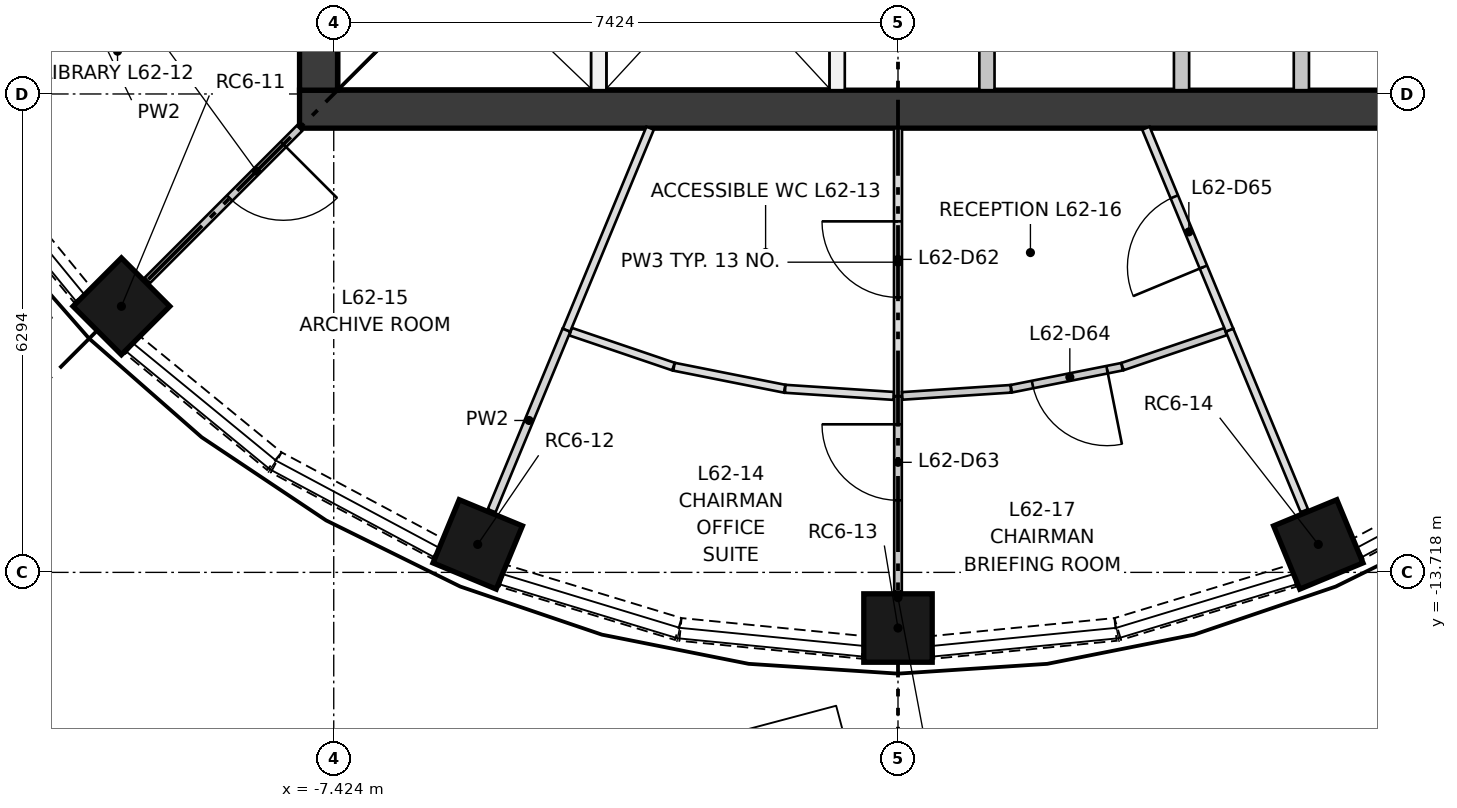
"""IFC4 building model, lengths in metres.
Left out: names, types, materials, properties, quantities, classifications, styles, units other than length and angle.
Written with IfcOpenShell. Run it as: python <this file> out.ifc"""

import sys

from ifc_helpers import new_model, si_unit, direction, frame, frame_2d, origin, origin_2d, place, context, subcontext, project, spatial, rectangle, extrude, element, fill, save


model = new_model("IFC4")
c1 = context("Model", 3, precision=1e-05, world=origin(), true_north=direction((0.0, 1.0)))
c2 = subcontext(c1, "Body", "Model", "MODEL_VIEW")
j1 = project(units=[si_unit("LENGTHUNIT", "METRE"), si_unit("PLANEANGLEUNIT", "RADIAN")], contexts=[c1])
p1 = place(None, origin())
s1 = spatial("IfcSite", under=j1, at=p1, CompositionType="ELEMENT")
p2 = place(p1, origin())
s2 = spatial("IfcBuilding", under=s1, at=p2, CompositionType="ELEMENT")
p3 = place(p2, frame((0.0, 0.0, 227.85)))
s3 = spatial("IfcBuildingStorey", under=s2, at=p3, CompositionType="ELEMENT", Elevation=227.85)
for number, where, z_axis, x_axis in (
    (1, (-10.218, -10.218, 0.5), (0.0, 0.0, 1.0), (-0.707, -0.707, 0.0)),
    (2, (-5.53, -13.35, 0.5), (0.0, 0.0, 1.0), (-0.383, -0.924, 0.0)),
    (3, (0.0, -14.45, 0.5), (0.0, 0.0, 1.0), (0.0, -1.0, 0.0)),
    (4, (5.53, -13.35, 0.5), (0.0, 0.0, 1.0), (0.383, -0.924, 0.0)),
):
    element("IfcColumn", number, at=place(p3, frame(where, z_axis=z_axis, x_axis=x_axis)), inside=s3, PredefinedType="COLUMN", context=c2, shape_type="SweptSolid", body=[
        extrude(rectangle(XDim=0.9, YDim=0.9, at=origin_2d()), origin(), (0.0, 0.0, 1.0), 2.35),
    ])
p4 = place(p3, frame((-7.874, -7.624, 0.0), z_axis=(0.0, 0.0, 1.0), x_axis=(1.0, 0.0, 0.0)))
e5 = element("IfcWall", 5, at=p4, inside=s3, PredefinedType="SHEAR", context=c2, shape_type="SweptSolid", body=[
    extrude(rectangle(XDim=15.748, YDim=0.5, at=frame_2d((7.874, 0.0))), origin(), (0.0, 0.0, 1.0), 3.35),
])
p5 = place(p3, frame((-7.624, -7.374, 0.0), z_axis=(0.0, 0.0, 1.0), x_axis=(0.0, 1.0, 0.0)))
e6 = element("IfcWall", 6, at=p5, inside=s3, PredefinedType="SHEAR", context=c2, shape_type="SweptSolid", body=[
    extrude(rectangle(XDim=14.748, YDim=0.5, at=frame_2d((7.374, 0.0))), origin(), (0.0, 0.0, 1.0), 3.35),
])
p6 = place(p5, frame((6.874, 0.0, 0.0)))
e7 = element("IfcOpeningElement", 7, at=p6, cuts=e6, PredefinedType="OPENING", context=c2, shape_type="SweptSolid", body=[
    extrude(rectangle(XDim=1.0, YDim=2.1, at=frame_2d((0.5, 1.05))), frame((0.0, 0.26, 0.0), z_axis=(0.0, -1.0, 0.0), x_axis=(1.0, 0.0, 0.0)), (0.0, 0.0, 1.0), 0.52),
])
p7 = place(p5, frame((3.75, 0.0, 0.0)))
e8 = element("IfcOpeningElement", 8, at=p7, cuts=e6, PredefinedType="OPENING", context=c2, shape_type="SweptSolid", body=[
    extrude(rectangle(XDim=1.8, YDim=2.1, at=frame_2d((0.9, 1.05))), frame((0.0, 0.26, 0.0), z_axis=(0.0, -1.0, 0.0), x_axis=(1.0, 0.0, 0.0)), (0.0, 0.0, 1.0), 0.52),
])
p8 = place(p5, frame((9.198, 0.0, 0.0)))
e9 = element("IfcOpeningElement", 9, at=p8, cuts=e6, PredefinedType="OPENING", context=c2, shape_type="SweptSolid", body=[
    extrude(rectangle(XDim=1.8, YDim=2.1, at=frame_2d((0.9, 1.05))), frame((0.0, 0.26, 0.0), z_axis=(0.0, -1.0, 0.0), x_axis=(1.0, 0.0, 0.0)), (0.0, 0.0, 1.0), 0.52),
])
for number, where, z_axis, x_axis in (
    (10, (-3.937, -7.374, 0.0), (0.0, 0.0, 1.0), (0.0, 1.0, 0.0)),
    (11, (-0.8, -7.374, 0.0), (0.0, 0.0, 1.0), (0.0, 1.0, 0.0)),
    (12, (1.17, -7.374, 0.0), (0.0, 0.0, 1.0), (0.0, 1.0, 0.0)),
    (13, (3.73, -7.374, 0.0), (0.0, 0.0, 1.0), (0.0, 1.0, 0.0)),
    (14, (5.307, -7.374, 0.0), (0.0, 0.0, 1.0), (0.0, 1.0, 0.0)),
):
    element("IfcWall", number, at=place(p3, frame(where, z_axis=z_axis, x_axis=x_axis)), inside=s3, PredefinedType="PARTITIONING", context=c2, shape_type="SweptSolid", body=[
        extrude(rectangle(XDim=3.2, YDim=0.2, at=frame_2d((1.6, 0.0))), origin(), (0.0, 0.0, 1.0), 3.0),
    ])
for number, where, z_axis, x_axis in (
    (15, (-12.254, -8.206, 0.0), (0.0, 0.0, 1.0), (0.634, -0.773, 0.0)),
    (16, (-10.07, -10.726, 0.0), (0.0, 0.0, 1.0), (0.773, -0.634, 0.0)),
):
    element("IfcWall", number, at=place(p3, frame(where, z_axis=z_axis, x_axis=x_axis)), inside=s3, PredefinedType="SOLIDWALL", context=c2, shape_type="SweptSolid", body=[
        extrude(rectangle(XDim=2.411, YDim=0.3, at=frame_2d((1.206, 0.0))), origin(), (0.0, 0.0, 1.0), 0.9),
    ])
p9 = place(p3, frame((-8.181, -12.271, 0.0), z_axis=(0.0, 0.0, 1.0), x_axis=(0.881962886229, -0.471318859495, 0.0)))
e17 = element("IfcWall", 17, at=p9, inside=s3, PredefinedType="SOLIDWALL", context=c2, shape_type="SweptSolid", body=[
    extrude(rectangle(XDim=2.41, YDim=0.3, at=frame_2d((1.205, 0.0))), origin(), (0.0, 0.0, 1.0), 0.9),
])
p10 = place(p3, frame((-5.198, -13.762, 0.0), z_axis=(0.0, 0.0, 1.0), x_axis=(0.956901683383, -0.290412066449, 0.0)))
e18 = element("IfcWall", 18, at=p10, inside=s3, PredefinedType="SOLIDWALL", context=c2, shape_type="SweptSolid", body=[
    extrude(rectangle(XDim=2.411, YDim=0.3, at=frame_2d((1.206, 0.0))), origin(), (0.0, 0.0, 1.0), 0.9),
])
for number, where, z_axis, x_axis in (
    (19, (-2.862, -14.469, 0.0), (0.0, 0.0, 1.0), (0.995, -0.098, 0.0)),
    (20, (0.463, -14.705, 0.0), (0.0, 0.0, 1.0), (0.995, 0.098, 0.0)),
):
    element("IfcWall", number, at=place(p3, frame(where, z_axis=z_axis, x_axis=x_axis)), inside=s3, PredefinedType="SOLIDWALL", context=c2, shape_type="SweptSolid", body=[
        extrude(rectangle(XDim=2.411, YDim=0.3, at=frame_2d((1.205, 0.0))), origin(), (0.0, 0.0, 1.0), 0.9),
    ])
p11 = place(p3, frame((2.891, -14.463, 0.0), z_axis=(0.0, 0.0, 1.0), x_axis=(0.956901683383, 0.290412066449, 0.0)))
e21 = element("IfcWall", 21, at=p11, inside=s3, PredefinedType="SOLIDWALL", context=c2, shape_type="SweptSolid", body=[
    extrude(rectangle(XDim=2.411, YDim=0.3, at=frame_2d((1.206, 0.0))), origin(), (0.0, 0.0, 1.0), 0.9),
])
p12 = place(p3, frame((6.055, -13.407, 0.0), z_axis=(0.0, 0.0, 1.0), x_axis=(0.881962886229, 0.471318859495, 0.0)))
e22 = element("IfcWall", 22, at=p12, inside=s3, PredefinedType="SOLIDWALL", context=c2, shape_type="SweptSolid", body=[
    extrude(rectangle(XDim=2.41, YDim=0.3, at=frame_2d((1.205, 0.0))), origin(), (0.0, 0.0, 1.0), 0.9),
])
p13 = place(p3, frame((-7.874, -7.874, 0.0), z_axis=(0.0, 0.0, 1.0), x_axis=(-0.707106781187, -0.707106781187, 0.0)))
e23 = element("IfcWall", 23, at=p13, inside=s3, PredefinedType="PARTITIONING", context=c2, shape_type="SweptSolid", body=[
    extrude(rectangle(XDim=2.835, YDim=0.1, at=frame_2d((1.417, 0.0))), origin(), (0.0, 0.0, 1.0), 3.0),
])
p14 = place(p13, frame((0.3, 0.0, 0.0)))
e24 = element("IfcOpeningElement", 24, at=p14, cuts=e23, PredefinedType="OPENING", context=c2, shape_type="SweptSolid", body=[
    extrude(rectangle(XDim=1.0, YDim=2.1, at=frame_2d((0.5, 1.05))), frame((0.0, 0.06, 0.0), z_axis=(0.0, -1.0, 0.0), x_axis=(1.0, 0.0, 0.0)), (0.0, 0.0, 1.0), 0.12),
])
p15 = place(p3, frame((-2.954, -11.01, 0.0), z_axis=(0.0, 0.0, 1.0), x_axis=(-0.946909066327, 0.321501508719, 0.0)))
e25 = element("IfcWall", 25, at=p15, inside=s3, PredefinedType="PARTITIONING", context=c2, shape_type="SweptSolid", body=[
    extrude(rectangle(XDim=1.429, YDim=0.105, at=frame_2d((0.715, 0.0))), origin(), (0.0, 0.0, 1.0), 3.0),
])
p16 = place(p3, frame((-1.491, -11.302, 0.0), z_axis=(0.0, 0.0, 1.0), x_axis=(-0.980782621603, 0.195103688229, 0.0)))
e26 = element("IfcWall", 26, at=p16, inside=s3, PredefinedType="PARTITIONING", context=c2, shape_type="SweptSolid", body=[
    extrude(rectangle(XDim=1.484, YDim=0.105, at=frame_2d((0.742, 0.0))), origin(), (0.0, 0.0, 1.0), 3.0),
])
p17 = place(p3, frame((-0.056, -11.396, 0.0), z_axis=(0.0, 0.0, 1.0), x_axis=(-0.997865154475, 0.065307989433, 0.0)))
e27 = element("IfcWall", 27, at=p17, inside=s3, PredefinedType="PARTITIONING", context=c2, shape_type="SweptSolid", body=[
    extrude(rectangle(XDim=1.432, YDim=0.105, at=frame_2d((0.716, 0.0))), origin(), (0.0, 0.0, 1.0), 3.0),
])
p18 = place(p3, frame((-4.363, -10.532, 0.0), z_axis=(0.0, 0.0, 1.0), x_axis=(0.382686527355, 0.923878250519, 0.0)))
e28 = element("IfcWall", 28, at=p18, inside=s3, PredefinedType="PARTITIONING", context=c2, shape_type="SweptSolid", body=[
    extrude(rectangle(XDim=2.877, YDim=0.105, at=frame_2d((1.438, 0.0))), origin(), (0.0, 0.0, 1.0), 3.0),
])
p19 = place(p3, frame((0.0, -11.4, 0.0), z_axis=(0.0, 0.0, 1.0), x_axis=(0.0, 1.0, 0.0)))
e29 = element("IfcWall", 29, at=p19, inside=s3, PredefinedType="PARTITIONING", context=c2, shape_type="SweptSolid", body=[
    extrude(rectangle(XDim=3.526, YDim=0.105, at=frame_2d((1.763, 0.0))), origin(), (0.0, 0.0, 1.0), 3.0),
])
p20 = place(p19, frame((1.3, 0.0, 0.0)))
e30 = element("IfcOpeningElement", 30, at=p20, cuts=e29, PredefinedType="OPENING", context=c2, shape_type="SweptSolid", body=[
    extrude(rectangle(XDim=1.0, YDim=2.1, at=frame_2d((0.5, 1.05))), frame((0.0, 0.062, 0.0), z_axis=(0.0, -1.0, 0.0), x_axis=(1.0, 0.0, 0.0)), (0.0, 0.0, 1.0), 0.125),
])
p21 = place(p3, frame((-5.346, -12.906, 0.0), z_axis=(0.0, 0.0, 1.0), x_axis=(0.382746119312, 0.923853564236, 0.0)))
e31 = element("IfcWall", 31, at=p21, inside=s3, PredefinedType="PARTITIONING", context=c2, shape_type="SweptSolid", body=[
    extrude(rectangle(XDim=2.57, YDim=0.11, at=frame_2d((1.285, 0.0))), origin(), (0.0, 0.0, 1.0), 3.0),
])
p22 = place(p3, frame((0.0, -13.97, 0.0), z_axis=(0.0, 0.0, 1.0), x_axis=(0.0, 1.0, 0.0)))
e32 = element("IfcWall", 32, at=p22, inside=s3, PredefinedType="PARTITIONING", context=c2, shape_type="SweptSolid", body=[
    extrude(rectangle(XDim=2.57, YDim=0.1, at=frame_2d((1.285, 0.0))), origin(), (0.0, 0.0, 1.0), 3.0),
])
p23 = place(p22, frame((1.2, 0.0, 0.0)))
e33 = element("IfcOpeningElement", 33, at=p23, cuts=e32, PredefinedType="OPENING", context=c2, shape_type="SweptSolid", body=[
    extrude(rectangle(XDim=1.0, YDim=2.1, at=frame_2d((0.5, 1.05))), frame((0.0, 0.06, 0.0), z_axis=(0.0, -1.0, 0.0), x_axis=(1.0, 0.0, 0.0)), (0.0, 0.0, 1.0), 0.12),
])
p24 = place(p3, frame((1.485, -11.303, 0.0), z_axis=(0.0, 0.0, 1.0), x_axis=(-0.997865154475, -0.065307989433, 0.0)))
e34 = element("IfcWall", 34, at=p24, inside=s3, PredefinedType="PARTITIONING", context=c2, shape_type="SweptSolid", body=[
    extrude(rectangle(XDim=1.432, YDim=0.1, at=frame_2d((0.716, 0.0))), origin(), (0.0, 0.0, 1.0), 3.0),
])
p25 = place(p3, frame((2.947, -11.012, 0.0), z_axis=(0.0, 0.0, 1.0), x_axis=(-0.9807636688, -0.195198939448, 0.0)))
e35 = element("IfcWall", 35, at=p25, inside=s3, PredefinedType="PARTITIONING", context=c2, shape_type="SweptSolid", body=[
    extrude(rectangle(XDim=1.485, YDim=0.1, at=frame_2d((0.742, 0.0))), origin(), (0.0, 0.0, 1.0), 3.0),
])
p26 = place(p25, frame((0.2, 0.0, 0.0)))
e36 = element("IfcOpeningElement", 36, at=p26, cuts=e35, PredefinedType="OPENING", context=c2, shape_type="SweptSolid", body=[
    extrude(rectangle(XDim=1.0, YDim=2.1, at=frame_2d((0.5, 1.05))), frame((0.0, 0.06, 0.0), z_axis=(0.0, -1.0, 0.0), x_axis=(1.0, 0.0, 0.0)), (0.0, 0.0, 1.0), 0.12),
])
p27 = place(p3, frame((4.31, -10.55, 0.0), z_axis=(0.0, 0.0, 1.0), x_axis=(-0.946964806335, -0.321337292519, 0.0)))
e37 = element("IfcWall", 37, at=p27, inside=s3, PredefinedType="PARTITIONING", context=c2, shape_type="SweptSolid", body=[
    extrude(rectangle(XDim=1.432, YDim=0.1, at=frame_2d((0.716, 0.0))), origin(), (0.0, 0.0, 1.0), 3.0),
])
p28 = place(p3, frame((4.363, -10.532, 0.0), z_axis=(0.0, 0.0, 1.0), x_axis=(-0.382686527355, 0.923878250519, 0.0)))
e38 = element("IfcWall", 38, at=p28, inside=s3, PredefinedType="PARTITIONING", context=c2, shape_type="SweptSolid", body=[
    extrude(rectangle(XDim=2.877, YDim=0.105, at=frame_2d((1.438, 0.0))), origin(), (0.0, 0.0, 1.0), 3.0),
])
p29 = place(p28, frame((0.9, 0.0, 0.0)))
e39 = element("IfcOpeningElement", 39, at=p29, cuts=e38, PredefinedType="OPENING", context=c2, shape_type="SweptSolid", body=[
    extrude(rectangle(XDim=1.0, YDim=2.1, at=frame_2d((0.5, 1.05))), frame((0.0, 0.062, 0.0), z_axis=(0.0, -1.0, 0.0), x_axis=(1.0, 0.0, 0.0)), (0.0, 0.0, 1.0), 0.125),
])
p30 = place(p3, frame((4.363, -10.532, 0.0), z_axis=(0.0, 0.0, 1.0), x_axis=(0.382746119312, -0.923853564236, 0.0)))
e40 = element("IfcWall", 40, at=p30, inside=s3, PredefinedType="PARTITIONING", context=c2, shape_type="SweptSolid", body=[
    extrude(rectangle(XDim=2.57, YDim=0.105, at=frame_2d((1.285, 0.0))), origin(), (0.0, 0.0, 1.0), 3.0),
])
p31 = place(p14, origin())
e41 = element("IfcDoor", 41, at=p31, inside=s3, OperationType="SINGLE_SWING_LEFT", PredefinedType="DOOR", context=c2, shape_type="SweptSolid", body=[
    extrude(rectangle(XDim=1.0, YDim=2.1, at=frame_2d((0.5, 1.05))), frame((0.0, 0.025, 0.0), z_axis=(0.0, -1.0, 0.0), x_axis=(1.0, 0.0, 0.0)), (0.0, 0.0, 1.0), 0.05),
])
fill(e24, e41)
p32 = place(p20, origin())
e42 = element("IfcDoor", 42, at=p32, inside=s3, OperationType="SINGLE_SWING_RIGHT", PredefinedType="DOOR", context=c2, shape_type="SweptSolid", body=[
    extrude(rectangle(XDim=1.0, YDim=2.1, at=frame_2d((0.5, 1.05))), frame((0.0, 0.025, 0.0), z_axis=(0.0, -1.0, 0.0), x_axis=(1.0, 0.0, 0.0)), (0.0, 0.0, 1.0), 0.05),
])
fill(e30, e42)
p33 = place(p23, origin())
e43 = element("IfcDoor", 43, at=p33, inside=s3, OperationType="SINGLE_SWING_RIGHT", PredefinedType="DOOR", context=c2, shape_type="SweptSolid", body=[
    extrude(rectangle(XDim=1.0, YDim=2.1, at=frame_2d((0.5, 1.05))), frame((0.0, 0.025, 0.0), z_axis=(0.0, -1.0, 0.0), x_axis=(1.0, 0.0, 0.0)), (0.0, 0.0, 1.0), 0.05),
])
fill(e33, e43)
p34 = place(p26, origin())
e44 = element("IfcDoor", 44, at=p34, inside=s3, OperationType="SINGLE_SWING_LEFT", PredefinedType="DOOR", context=c2, shape_type="SweptSolid", body=[
    extrude(rectangle(XDim=1.0, YDim=2.1, at=frame_2d((0.5, 1.05))), frame((0.0, 0.025, 0.0), z_axis=(0.0, -1.0, 0.0), x_axis=(1.0, 0.0, 0.0)), (0.0, 0.0, 1.0), 0.05),
])
fill(e36, e44)
p35 = place(p29, origin())
e45 = element("IfcDoor", 45, at=p35, inside=s3, OperationType="SINGLE_SWING_LEFT", PredefinedType="DOOR", context=c2, shape_type="SweptSolid", body=[
    extrude(rectangle(XDim=1.0, YDim=2.1, at=frame_2d((0.5, 1.05))), frame((0.0, 0.025, 0.0), z_axis=(0.0, -1.0, 0.0), x_axis=(1.0, 0.0, 0.0)), (0.0, 0.0, 1.0), 0.05),
])
fill(e39, e45)
save(model, sys.argv[1])
